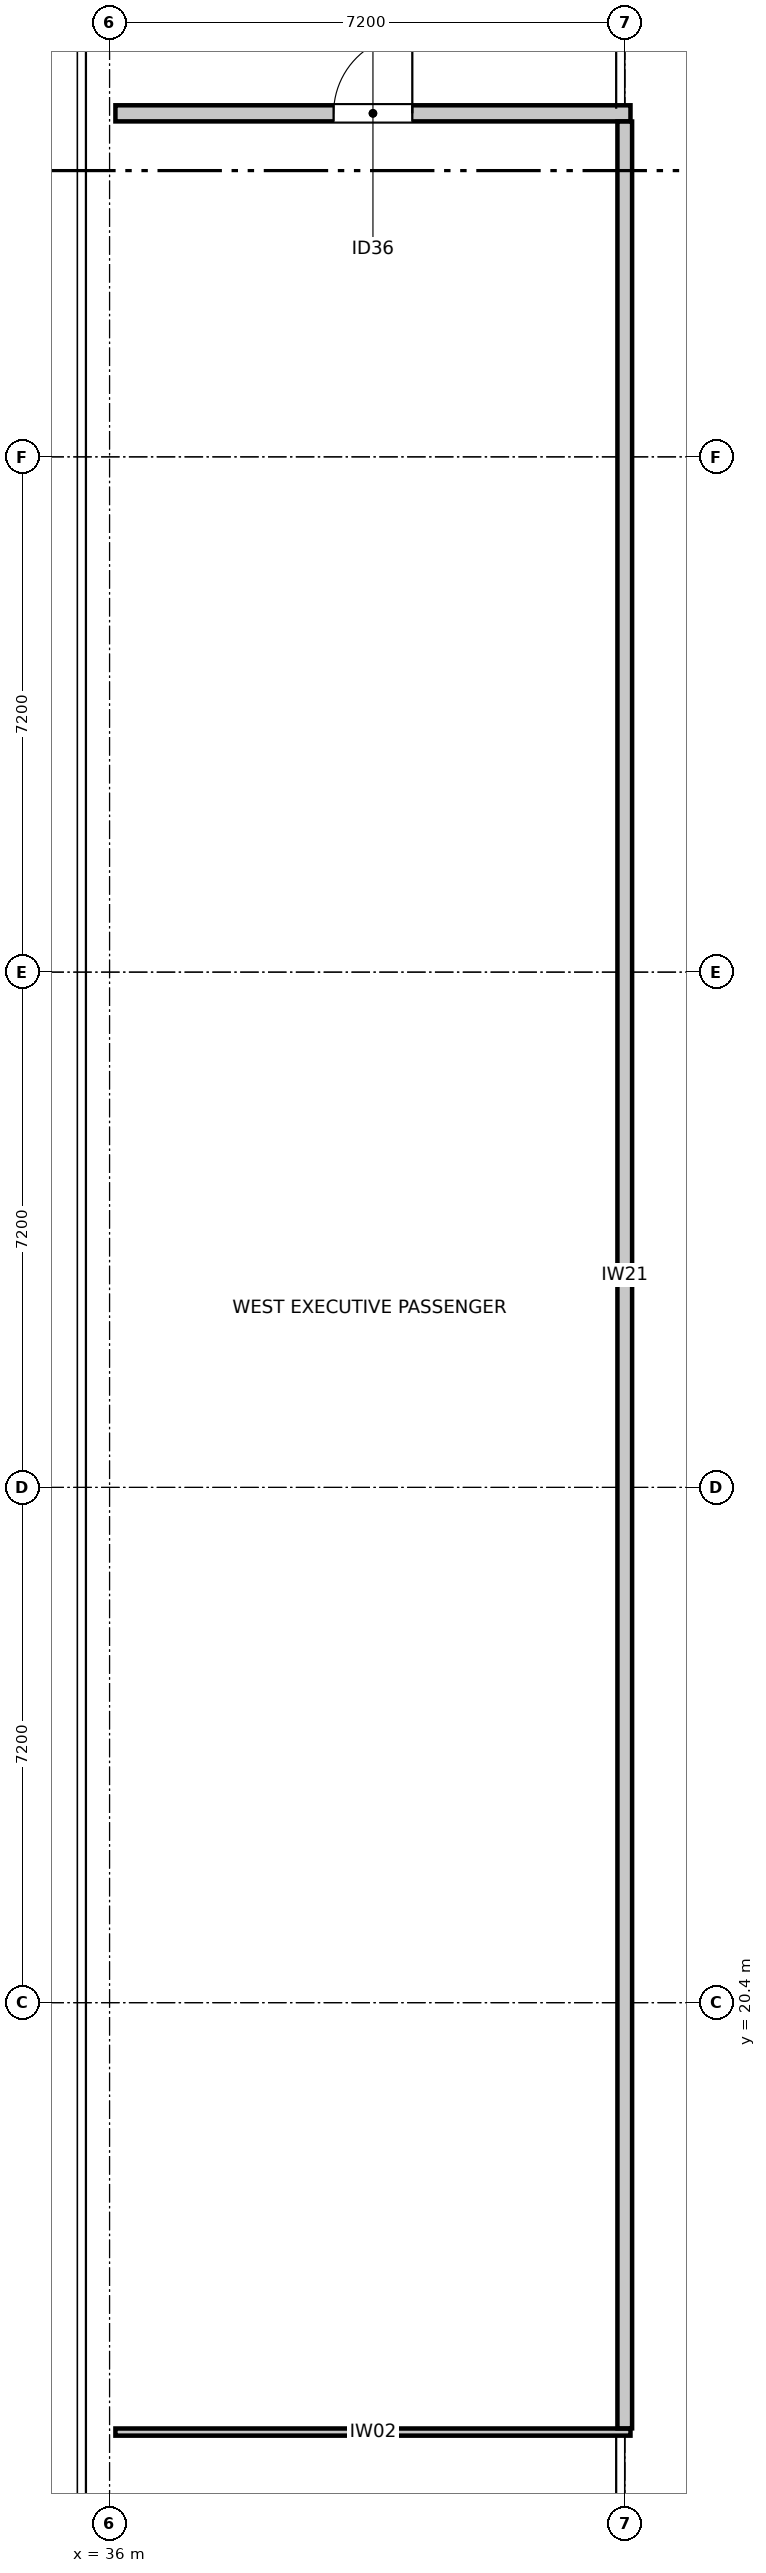
"""IFC4 building model, lengths in metres.
Left out: names, types, materials, properties, quantities, classifications, styles, units other than length and angle.
Written with IfcOpenShell. Run it as: python <this file> out.ifc"""

import sys

from ifc_helpers import new_model, si_unit, direction, frame, frame_2d, origin, place, context, subcontext, project, spatial, rectangle, extrude, element, fill, save


model = new_model("IFC4")
c1 = context("Model", 3, precision=1e-05, world=origin(), true_north=direction((0.0, 1.0)))
c2 = subcontext(c1, "Body", "Model", "MODEL_VIEW")
j1 = project(units=[si_unit("LENGTHUNIT", "METRE"), si_unit("PLANEANGLEUNIT", "RADIAN")], contexts=[c1])
p1 = place(None, origin())
s1 = spatial("IfcSite", under=j1, at=p1, CompositionType="ELEMENT")
p2 = place(p1, origin())
s2 = spatial("IfcBuilding", under=s1, at=p2, CompositionType="ELEMENT")
p3 = place(p2, frame((0.0, 0.0, 5.4)))
s3 = spatial("IfcBuildingStorey", under=s2, at=p3, CompositionType="ELEMENT", Elevation=5.4)
p4 = place(p3, frame((36.082, 46.8, 0.0), z_axis=(0.0, 0.0, 1.0), x_axis=(1.0, 0.0, 0.0)))
e1 = element("IfcWall", 1, at=p4, inside=s3, PredefinedType="PARTITIONING", context=c2, shape_type="SweptSolid", body=[
    extrude(rectangle(XDim=7.198, YDim=0.225, at=frame_2d((3.599, 0.0))), origin(), (0.0, 0.0, 1.0), 2.83),
])
p5 = place(p4, frame((3.049, 0.0, 0.0)))
e2 = element("IfcOpeningElement", 2, at=p5, cuts=e1, PredefinedType="OPENING", context=c2, shape_type="SweptSolid", body=[
    extrude(rectangle(XDim=1.1, YDim=2.28, at=frame_2d((0.55, 1.14))), frame((0.0, 0.123, 0.0), z_axis=(0.0, -1.0, 0.0), x_axis=(1.0, 0.0, 0.0)), (0.0, 0.0, 1.0), 0.245),
])
p6 = place(p3, frame((43.28, 14.4, 0.0), z_axis=(0.0, 0.0, 1.0), x_axis=(-1.0, 0.0, 0.0)))
e3 = element("IfcWall", 3, at=p6, inside=s3, PredefinedType="PARTITIONING", context=c2, shape_type="SweptSolid", body=[
    extrude(rectangle(XDim=7.198, YDim=0.1, at=frame_2d((3.599, 0.0))), origin(), (0.0, 0.0, 1.0), 2.83),
])
p7 = place(p3, frame((43.2, 46.686, 0.0), z_axis=(0.0, 0.0, 1.0), x_axis=(0.0, -1.0, 0.0)))
e4 = element("IfcWall", 4, at=p7, inside=s3, PredefinedType="PARTITIONING", context=c2, shape_type="SweptSolid", body=[
    extrude(rectangle(XDim=32.234, YDim=0.205, at=frame_2d((16.117, 0.0))), origin(), (0.0, 0.0, 1.0), 2.83),
])
p8 = place(p5, origin())
e5 = element("IfcDoor", 5, at=p8, inside=s3, OperationType="SINGLE_SWING_RIGHT", PredefinedType="DOOR", context=c2, shape_type="SweptSolid", body=[
    extrude(rectangle(XDim=1.1, YDim=2.28, at=frame_2d((0.55, 1.14))), frame((0.0, 0.025, 0.0), z_axis=(0.0, -1.0, 0.0), x_axis=(1.0, 0.0, 0.0)), (0.0, 0.0, 1.0), 0.05),
])
fill(e2, e5)
save(model, sys.argv[1])
